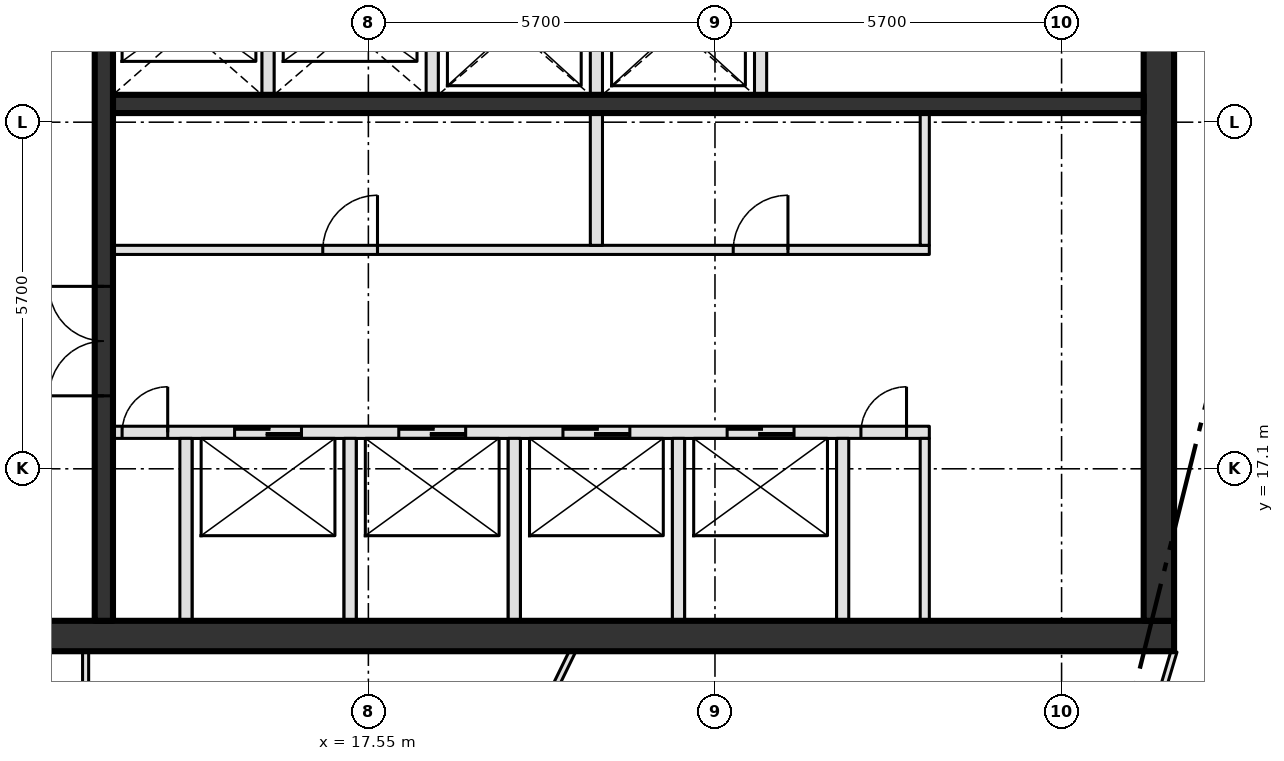
"""IFC4 building model, lengths in metres.
Left out: names, types, materials, properties, quantities, classifications, styles, units other than length and angle.
Written with IfcOpenShell. Run it as: python <this file> out.ifc"""

import sys

from ifc_helpers import new_model, si_unit, direction, frame, frame_2d, origin, place, context, subcontext, project, spatial, rectangle, extrude, element, fill, save


model = new_model("IFC4")
c1 = context("Model", 3, precision=1e-05, world=origin(), true_north=direction((0.0, 1.0)))
c2 = subcontext(c1, "Body", "Model", "MODEL_VIEW")
j1 = project(units=[si_unit("LENGTHUNIT", "METRE"), si_unit("PLANEANGLEUNIT", "RADIAN")], contexts=[c1])
p1 = place(None, origin())
s1 = spatial("IfcSite", under=j1, at=p1, CompositionType="ELEMENT")
p2 = place(p1, origin())
s2 = spatial("IfcBuilding", under=s1, at=p2, CompositionType="ELEMENT")
p3 = place(p2, frame((0.0, 0.0, 370.8)))
s3 = spatial("IfcBuildingStorey", under=s2, at=p3, CompositionType="ELEMENT", Elevation=370.8)
p4 = place(p3, frame((8.0, 14.35, -0.3), z_axis=(0.0, 0.0, 1.0), x_axis=(1.0, 0.0, 0.0)))
e1 = element("IfcWall", 1, at=p4, inside=s3, PredefinedType="SHEAR", context=c2, shape_type="SweptSolid", body=[
    extrude(rectangle(XDim=22.8, YDim=0.5, at=frame_2d((11.4, 0.0))), origin(), (0.0, 0.0, 1.0), 4.2),
])
p5 = place(p4, frame((2.3, 0.0, 0.3)))
e2 = element("IfcOpeningElement", 2, at=p5, cuts=e1, PredefinedType="OPENING", context=c2, shape_type="SweptSolid", body=[
    extrude(rectangle(XDim=1.8, YDim=2.1, at=frame_2d((0.9, 1.05))), frame((0.0, 0.26, 0.0), z_axis=(0.0, -1.0, 0.0), x_axis=(1.0, 0.0, 0.0)), (0.0, 0.0, 1.0), 0.52),
])
p6 = place(p3, frame((30.55, 14.6, -0.3), z_axis=(0.0, 0.0, 1.0), x_axis=(0.0, 1.0, 0.0)))
e3 = element("IfcWall", 3, at=p6, inside=s3, PredefinedType="SHEAR", context=c2, shape_type="SweptSolid", body=[
    extrude(rectangle(XDim=21.1, YDim=0.5, at=frame_2d((10.55, 0.0))), origin(), (0.0, 0.0, 1.0), 4.2),
])
p7 = place(p3, frame((13.35, 17.7, 0.0), z_axis=(0.0, 0.0, 1.0), x_axis=(1.0, 0.0, 0.0)))
e4 = element("IfcWall", 4, at=p7, inside=s3, PredefinedType="SOLIDWALL", context=c2, shape_type="SweptSolid", body=[
    extrude(rectangle(XDim=13.425, YDim=0.2, at=frame_2d((6.712, 0.0))), origin(), (0.0, 0.0, 1.0), 3.9),
])
p8 = place(p7, frame((2.0, 0.0, 0.0)))
e5 = element("IfcOpeningElement", 5, at=p8, cuts=e4, PredefinedType="OPENING", context=c2, shape_type="SweptSolid", body=[
    extrude(rectangle(XDim=1.1, YDim=2.1, at=frame_2d((0.55, 1.05))), frame((0.0, 0.11, 0.0), z_axis=(0.0, -1.0, 0.0), x_axis=(1.0, 0.0, 0.0)), (0.0, 0.0, 1.0), 0.22),
])
p9 = place(p7, frame((4.7, 0.0, 0.0)))
e6 = element("IfcOpeningElement", 6, at=p9, cuts=e4, PredefinedType="OPENING", context=c2, shape_type="SweptSolid", body=[
    extrude(rectangle(XDim=1.1, YDim=2.1, at=frame_2d((0.55, 1.05))), frame((0.0, 0.11, 0.0), z_axis=(0.0, -1.0, 0.0), x_axis=(1.0, 0.0, 0.0)), (0.0, 0.0, 1.0), 0.22),
])
p10 = place(p7, frame((7.4, 0.0, 0.0)))
e7 = element("IfcOpeningElement", 7, at=p10, cuts=e4, PredefinedType="OPENING", context=c2, shape_type="SweptSolid", body=[
    extrude(rectangle(XDim=1.1, YDim=2.1, at=frame_2d((0.55, 1.05))), frame((0.0, 0.11, 0.0), z_axis=(0.0, -1.0, 0.0), x_axis=(1.0, 0.0, 0.0)), (0.0, 0.0, 1.0), 0.22),
])
p11 = place(p7, frame((10.1, 0.0, 0.0)))
e8 = element("IfcOpeningElement", 8, at=p11, cuts=e4, PredefinedType="OPENING", context=c2, shape_type="SweptSolid", body=[
    extrude(rectangle(XDim=1.1, YDim=2.1, at=frame_2d((0.55, 1.05))), frame((0.0, 0.11, 0.0), z_axis=(0.0, -1.0, 0.0), x_axis=(1.0, 0.0, 0.0)), (0.0, 0.0, 1.0), 0.22),
])
p12 = place(p7, frame((0.15, 0.0, 0.0)))
e9 = element("IfcOpeningElement", 9, at=p12, cuts=e4, PredefinedType="OPENING", context=c2, shape_type="SweptSolid", body=[
    extrude(rectangle(XDim=0.75, YDim=2.1, at=frame_2d((0.375, 1.05))), frame((0.0, 0.11, 0.0), z_axis=(0.0, -1.0, 0.0), x_axis=(1.0, 0.0, 0.0)), (0.0, 0.0, 1.0), 0.22),
])
p13 = place(p7, frame((12.3, 0.0, 0.0)))
e10 = element("IfcOpeningElement", 10, at=p13, cuts=e4, PredefinedType="OPENING", context=c2, shape_type="SweptSolid", body=[
    extrude(rectangle(XDim=0.75, YDim=2.1, at=frame_2d((0.375, 1.05))), frame((0.0, 0.11, 0.0), z_axis=(0.0, -1.0, 0.0), x_axis=(1.0, 0.0, 0.0)), (0.0, 0.0, 1.0), 0.22),
])
p14 = place(p3, frame((13.35, 20.7, 0.0), z_axis=(0.0, 0.0, 1.0), x_axis=(1.0, 0.0, 0.0)))
e11 = element("IfcWall", 11, at=p14, inside=s3, PredefinedType="PARTITIONING", context=c2, shape_type="SweptSolid", body=[
    extrude(rectangle(XDim=13.425, YDim=0.15, at=frame_2d((6.712, 0.0))), origin(), (0.0, 0.0, 1.0), 3.9),
])
p15 = place(p14, frame((3.45, 0.0, 0.0)))
e12 = element("IfcOpeningElement", 12, at=p15, cuts=e11, PredefinedType="OPENING", context=c2, shape_type="SweptSolid", body=[
    extrude(rectangle(XDim=0.9, YDim=2.1, at=frame_2d((0.45, 1.05))), frame((0.0, 0.085, 0.0), z_axis=(0.0, -1.0, 0.0), x_axis=(1.0, 0.0, 0.0)), (0.0, 0.0, 1.0), 0.17),
])
p16 = place(p14, frame((10.2, 0.0, 0.0)))
e13 = element("IfcOpeningElement", 13, at=p16, cuts=e11, PredefinedType="OPENING", context=c2, shape_type="SweptSolid", body=[
    extrude(rectangle(XDim=0.9, YDim=2.1, at=frame_2d((0.45, 1.05))), frame((0.0, 0.085, 0.0), z_axis=(0.0, -1.0, 0.0), x_axis=(1.0, 0.0, 0.0)), (0.0, 0.0, 1.0), 0.17),
])
p17 = place(p3, frame((13.35, 23.1, 0.0), z_axis=(0.0, 0.0, 1.0), x_axis=(1.0, 0.0, 0.0)))
e14 = element("IfcWall", 14, at=p17, inside=s3, PredefinedType="SHEAR", context=c2, shape_type="SweptSolid", body=[
    extrude(rectangle(XDim=16.95, YDim=0.3, at=frame_2d((8.475, 0.0))), origin(), (0.0, 0.0, 1.0), 3.9),
])
p18 = place(p3, frame((13.2, 14.6, 0.0), z_axis=(0.0, 0.0, 1.0), x_axis=(0.0, 1.0, 0.0)))
e15 = element("IfcWall", 15, at=p18, inside=s3, PredefinedType="SHEAR", context=c2, shape_type="SweptSolid", body=[
    extrude(rectangle(XDim=21.1, YDim=0.3, at=frame_2d((10.55, 0.0))), origin(), (0.0, 0.0, 1.0), 3.9),
])
p19 = place(p18, frame((3.7, 0.0, 0.0)))
e16 = element("IfcOpeningElement", 16, at=p19, cuts=e15, PredefinedType="OPENING", context=c2, shape_type="SweptSolid", body=[
    extrude(rectangle(XDim=1.8, YDim=2.1, at=frame_2d((0.9, 1.05))), frame((0.0, 0.16, 0.0), z_axis=(0.0, -1.0, 0.0), x_axis=(1.0, 0.0, 0.0)), (0.0, 0.0, 1.0), 0.32),
])
p20 = place(p18, frame((11.8, 0.0, 0.0)))
e17 = element("IfcOpeningElement", 17, at=p20, cuts=e15, PredefinedType="OPENING", context=c2, shape_type="SweptSolid", body=[
    extrude(rectangle(XDim=1.2, YDim=2.1, at=frame_2d((0.6, 1.05))), frame((0.0, 0.16, 0.0), z_axis=(0.0, -1.0, 0.0), x_axis=(1.0, 0.0, 0.0)), (0.0, 0.0, 1.0), 0.32),
])
p21 = place(p3, frame((14.55, 14.6, 0.0), z_axis=(0.0, 0.0, 1.0), x_axis=(0.0, 1.0, 0.0)))
e18 = element("IfcWall", 18, at=p21, inside=s3, PredefinedType="SOLIDWALL", context=c2, shape_type="SweptSolid", body=[
    extrude(rectangle(XDim=3.0, YDim=0.2, at=frame_2d((1.5, 0.0))), origin(), (0.0, 0.0, 1.0), 3.9),
])
p22 = place(p3, frame((15.9, 23.25, 0.0), z_axis=(0.0, 0.0, 1.0), x_axis=(0.0, 1.0, 0.0)))
e19 = element("IfcWall", 19, at=p22, inside=s3, PredefinedType="SOLIDWALL", context=c2, shape_type="SweptSolid", body=[
    extrude(rectangle(XDim=2.15, YDim=0.2, at=frame_2d((1.075, 0.0))), origin(), (0.0, 0.0, 1.0), 3.9),
])
p23 = place(p3, frame((17.25, 14.6, 0.0), z_axis=(0.0, 0.0, 1.0), x_axis=(0.0, 1.0, 0.0)))
e20 = element("IfcWall", 20, at=p23, inside=s3, PredefinedType="SOLIDWALL", context=c2, shape_type="SweptSolid", body=[
    extrude(rectangle(XDim=3.0, YDim=0.2, at=frame_2d((1.5, 0.0))), origin(), (0.0, 0.0, 1.0), 3.9),
])
p24 = place(p3, frame((18.6, 23.25, 0.0), z_axis=(0.0, 0.0, 1.0), x_axis=(0.0, 1.0, 0.0)))
e21 = element("IfcWall", 21, at=p24, inside=s3, PredefinedType="SOLIDWALL", context=c2, shape_type="SweptSolid", body=[
    extrude(rectangle(XDim=5.15, YDim=0.2, at=frame_2d((2.575, 0.0))), origin(), (0.0, 0.0, 1.0), 3.9),
])
p25 = place(p24, frame((3.15, 0.0, 0.0)))
e22 = element("IfcOpeningElement", 22, at=p25, cuts=e21, PredefinedType="OPENING", context=c2, shape_type="SweptSolid", body=[
    extrude(rectangle(XDim=1.2, YDim=2.1, at=frame_2d((0.6, 1.05))), frame((0.0, 0.11, 0.0), z_axis=(0.0, -1.0, 0.0), x_axis=(1.0, 0.0, 0.0)), (0.0, 0.0, 1.0), 0.22),
])
p26 = place(p3, frame((19.95, 14.6, 0.0), z_axis=(0.0, 0.0, 1.0), x_axis=(0.0, 1.0, 0.0)))
e23 = element("IfcWall", 23, at=p26, inside=s3, PredefinedType="SOLIDWALL", context=c2, shape_type="SweptSolid", body=[
    extrude(rectangle(XDim=3.0, YDim=0.2, at=frame_2d((1.5, 0.0))), origin(), (0.0, 0.0, 1.0), 3.9),
])
p27 = place(p3, frame((21.3, 20.775, 0.0), z_axis=(0.0, 0.0, 1.0), x_axis=(0.0, 1.0, 0.0)))
e24 = element("IfcWall", 24, at=p27, inside=s3, PredefinedType="SOLIDWALL", context=c2, shape_type="SweptSolid", body=[
    extrude(rectangle(XDim=4.625, YDim=0.2, at=frame_2d((2.312, 0.0))), origin(), (0.0, 0.0, 1.0), 3.9),
])
p28 = place(p3, frame((22.65, 14.6, 0.0), z_axis=(0.0, 0.0, 1.0), x_axis=(0.0, 1.0, 0.0)))
e25 = element("IfcWall", 25, at=p28, inside=s3, PredefinedType="SOLIDWALL", context=c2, shape_type="SweptSolid", body=[
    extrude(rectangle(XDim=3.0, YDim=0.2, at=frame_2d((1.5, 0.0))), origin(), (0.0, 0.0, 1.0), 3.9),
])
p29 = place(p3, frame((24.0, 23.25, 0.0), z_axis=(0.0, 0.0, 1.0), x_axis=(0.0, 1.0, 0.0)))
e26 = element("IfcWall", 26, at=p29, inside=s3, PredefinedType="SOLIDWALL", context=c2, shape_type="SweptSolid", body=[
    extrude(rectangle(XDim=2.15, YDim=0.2, at=frame_2d((1.075, 0.0))), origin(), (0.0, 0.0, 1.0), 3.9),
])
p30 = place(p3, frame((25.35, 14.6, 0.0), z_axis=(0.0, 0.0, 1.0), x_axis=(0.0, 1.0, 0.0)))
e27 = element("IfcWall", 27, at=p30, inside=s3, PredefinedType="SOLIDWALL", context=c2, shape_type="SweptSolid", body=[
    extrude(rectangle(XDim=3.0, YDim=0.2, at=frame_2d((1.5, 0.0))), origin(), (0.0, 0.0, 1.0), 3.9),
])
p31 = place(p3, frame((26.7, 14.6, 0.0), z_axis=(0.0, 0.0, 1.0), x_axis=(0.0, 1.0, 0.0)))
e28 = element("IfcWall", 28, at=p31, inside=s3, PredefinedType="PARTITIONING", context=c2, shape_type="SweptSolid", body=[
    extrude(rectangle(XDim=3.0, YDim=0.15, at=frame_2d((1.5, 0.0))), origin(), (0.0, 0.0, 1.0), 3.9),
])
p32 = place(p3, frame((26.7, 20.775, 0.0), z_axis=(0.0, 0.0, 1.0), x_axis=(0.0, 1.0, 0.0)))
e29 = element("IfcWall", 29, at=p32, inside=s3, PredefinedType="PARTITIONING", context=c2, shape_type="SweptSolid", body=[
    extrude(rectangle(XDim=2.175, YDim=0.15, at=frame_2d((1.087, 0.0))), origin(), (0.0, 0.0, 1.0), 3.9),
])
p33 = place(p3, frame((12.9, 10.078, 0.0), z_axis=(0.0, 0.0, 1.0), x_axis=(0.0, 1.0, 0.0)))
e30 = element("IfcWall", 30, at=p33, inside=s3, PredefinedType="PARTITIONING", context=c2, shape_type="SweptSolid", body=[
    extrude(rectangle(XDim=4.022, YDim=0.1, at=frame_2d((2.011, 0.0))), origin(), (0.0, 0.0, 1.0), 3.9),
])
p34 = place(p3, frame((28.306, 5.749, 0.0), z_axis=(0.0, 0.0, 1.0), x_axis=(0.286170650389, 0.958178667502, 0.0)))
e31 = element("IfcWall", 31, at=p34, inside=s3, PredefinedType="PARTITIONING", context=c2, shape_type="SweptSolid", body=[
    extrude(rectangle(XDim=8.716, YDim=0.1, at=frame_2d((4.358, 0.0))), origin(), (0.0, 0.0, 1.0), 3.9),
])
p35 = place(p34, frame((1.43, 0.0, 0.0)))
e32 = element("IfcOpeningElement", 32, at=p35, cuts=e31, PredefinedType="OPENING", context=c2, shape_type="SweptSolid", body=[
    extrude(rectangle(XDim=1.0, YDim=2.1, at=frame_2d((0.5, 1.05))), frame((0.0, 0.06, 0.0), z_axis=(0.0, -1.0, 0.0), x_axis=(1.0, 0.0, 0.0)), (0.0, 0.0, 1.0), 0.12),
])
p36 = place(p3, frame((18.105, 8.354, 0.0), z_axis=(0.0, 0.0, 1.0), x_axis=(0.438424384383, 0.898768078638, 0.0)))
e33 = element("IfcWall", 33, at=p36, inside=s3, PredefinedType="PARTITIONING", context=c2, shape_type="SweptSolid", body=[
    extrude(rectangle(XDim=6.393, YDim=0.1, at=frame_2d((3.197, 0.0))), origin(), (0.0, 0.0, 1.0), 3.9),
])
p37 = place(p8, origin())
e34 = element("IfcDoor", 34, at=p37, inside=s3, OperationType="SLIDING_TO_LEFT", PredefinedType="DOOR", context=c2, shape_type="SweptSolid", body=[
    extrude(rectangle(XDim=1.1, YDim=2.1, at=frame_2d((0.55, 1.05))), frame((0.0, 0.025, 0.0), z_axis=(0.0, -1.0, 0.0), x_axis=(1.0, 0.0, 0.0)), (0.0, 0.0, 1.0), 0.05),
])
fill(e5, e34)
p38 = place(p9, origin())
e35 = element("IfcDoor", 35, at=p38, inside=s3, OperationType="SLIDING_TO_LEFT", PredefinedType="DOOR", context=c2, shape_type="SweptSolid", body=[
    extrude(rectangle(XDim=1.1, YDim=2.1, at=frame_2d((0.55, 1.05))), frame((0.0, 0.025, 0.0), z_axis=(0.0, -1.0, 0.0), x_axis=(1.0, 0.0, 0.0)), (0.0, 0.0, 1.0), 0.05),
])
fill(e6, e35)
p39 = place(p10, origin())
e36 = element("IfcDoor", 36, at=p39, inside=s3, OperationType="SLIDING_TO_LEFT", PredefinedType="DOOR", context=c2, shape_type="SweptSolid", body=[
    extrude(rectangle(XDim=1.1, YDim=2.1, at=frame_2d((0.55, 1.05))), frame((0.0, 0.025, 0.0), z_axis=(0.0, -1.0, 0.0), x_axis=(1.0, 0.0, 0.0)), (0.0, 0.0, 1.0), 0.05),
])
fill(e7, e36)
p40 = place(p11, origin())
e37 = element("IfcDoor", 37, at=p40, inside=s3, OperationType="SLIDING_TO_LEFT", PredefinedType="DOOR", context=c2, shape_type="SweptSolid", body=[
    extrude(rectangle(XDim=1.1, YDim=2.1, at=frame_2d((0.55, 1.05))), frame((0.0, 0.025, 0.0), z_axis=(0.0, -1.0, 0.0), x_axis=(1.0, 0.0, 0.0)), (0.0, 0.0, 1.0), 0.05),
])
fill(e8, e37)
p41 = place(p12, origin())
e38 = element("IfcDoor", 38, at=p41, inside=s3, OperationType="SINGLE_SWING_RIGHT", PredefinedType="DOOR", context=c2, shape_type="SweptSolid", body=[
    extrude(rectangle(XDim=0.75, YDim=2.1, at=frame_2d((0.375, 1.05))), frame((0.0, 0.025, 0.0), z_axis=(0.0, -1.0, 0.0), x_axis=(1.0, 0.0, 0.0)), (0.0, 0.0, 1.0), 0.05),
])
fill(e9, e38)
p42 = place(p13, origin())
e39 = element("IfcDoor", 39, at=p42, inside=s3, OperationType="SINGLE_SWING_RIGHT", PredefinedType="DOOR", context=c2, shape_type="SweptSolid", body=[
    extrude(rectangle(XDim=0.75, YDim=2.1, at=frame_2d((0.375, 1.05))), frame((0.0, 0.025, 0.0), z_axis=(0.0, -1.0, 0.0), x_axis=(1.0, 0.0, 0.0)), (0.0, 0.0, 1.0), 0.05),
])
fill(e10, e39)
p43 = place(p15, origin())
e40 = element("IfcDoor", 40, at=p43, inside=s3, OperationType="SINGLE_SWING_RIGHT", PredefinedType="DOOR", context=c2, shape_type="SweptSolid", body=[
    extrude(rectangle(XDim=0.9, YDim=2.1, at=frame_2d((0.45, 1.05))), frame((0.0, 0.025, 0.0), z_axis=(0.0, -1.0, 0.0), x_axis=(1.0, 0.0, 0.0)), (0.0, 0.0, 1.0), 0.05),
])
fill(e12, e40)
p44 = place(p16, origin())
e41 = element("IfcDoor", 41, at=p44, inside=s3, OperationType="SINGLE_SWING_RIGHT", PredefinedType="DOOR", context=c2, shape_type="SweptSolid", body=[
    extrude(rectangle(XDim=0.9, YDim=2.1, at=frame_2d((0.45, 1.05))), frame((0.0, 0.025, 0.0), z_axis=(0.0, -1.0, 0.0), x_axis=(1.0, 0.0, 0.0)), (0.0, 0.0, 1.0), 0.05),
])
fill(e13, e41)
p45 = place(p19, origin())
e42 = element("IfcDoor", 42, at=p45, inside=s3, OperationType="DOUBLE_DOOR_SINGLE_SWING", PredefinedType="DOOR", context=c2, shape_type="SweptSolid", body=[
    extrude(rectangle(XDim=1.8, YDim=2.1, at=frame_2d((0.9, 1.05))), frame((0.0, 0.025, 0.0), z_axis=(0.0, -1.0, 0.0), x_axis=(1.0, 0.0, 0.0)), (0.0, 0.0, 1.0), 0.05),
])
fill(e16, e42)
save(model, sys.argv[1])
